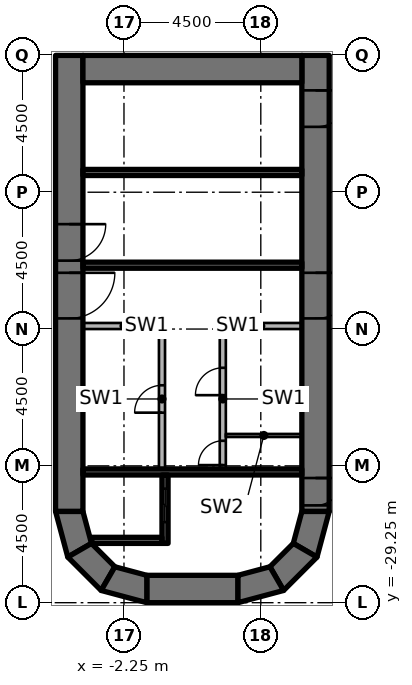
"""IFC4 building model, lengths in metres.
Left out: names, types, materials, properties, quantities, classifications, styles, units other than length and angle.
Written with IfcOpenShell. Run it as: python <this file> out.ifc"""

import sys

from ifc_helpers import new_model, si_unit, direction, frame, frame_2d, origin, place, context, subcontext, project, spatial, polyline, rectangle, outline, extrude, element, fill, save


model = new_model("IFC4")
c1 = context("Model", 3, precision=1e-05, world=origin(), true_north=direction((0.0, 1.0)))
c2 = subcontext(c1, "Body", "Model", "MODEL_VIEW")
j1 = project(units=[si_unit("LENGTHUNIT", "METRE"), si_unit("PLANEANGLEUNIT", "RADIAN")], contexts=[c1])
p1 = place(None, origin())
s1 = spatial("IfcSite", under=j1, at=p1, CompositionType="ELEMENT")
p2 = place(p1, origin())
s2 = spatial("IfcBuilding", under=s1, at=p2, CompositionType="ELEMENT")
p3 = place(p2, frame((0.0, 0.0, -8.0)))
s3 = spatial("IfcBuildingStorey", under=s2, at=p3, CompositionType="ELEMENT", Elevation=-8.0)
p4 = place(p3, frame((-4.05, -11.25, 0.0), z_axis=(0.0, 0.0, 1.0), x_axis=(0.0, -1.0, 0.0)))
e1 = element("IfcWall", 1, at=p4, inside=s3, PredefinedType="SHEAR", context=c2, shape_type="SweptSolid", body=[
    extrude(rectangle(XDim=15.0, YDim=0.9, at=frame_2d((7.5, 0.0))), origin(), (0.0, 0.0, 1.0), 4.0),
])
p5 = place(p4, frame((7.15, 0.0, 0.0)))
e2 = element("IfcOpeningElement", 2, at=p5, cuts=e1, PredefinedType="OPENING", context=c2, shape_type="SweptSolid", body=[
    extrude(rectangle(XDim=1.5, YDim=2.3, at=frame_2d((0.75, 1.15))), frame((0.0, 0.46, 0.0), z_axis=(0.0, -1.0, 0.0), x_axis=(1.0, 0.0, 0.0)), (0.0, 0.0, 1.0), 0.92),
])
p6 = place(p4, frame((5.55, 0.0, 0.0)))
e3 = element("IfcOpeningElement", 3, at=p6, cuts=e1, PredefinedType="OPENING", context=c2, shape_type="SweptSolid", body=[
    extrude(rectangle(XDim=1.2, YDim=2.1, at=frame_2d((0.6, 1.05))), frame((0.0, 0.46, 0.0), z_axis=(0.0, -1.0, 0.0), x_axis=(1.0, 0.0, 0.0)), (0.0, 0.0, 1.0), 0.92),
])
p7 = place(p3, frame((4.05, -11.25, 0.0), z_axis=(0.0, 0.0, 1.0), x_axis=(0.0, -1.0, 0.0)))
e4 = element("IfcWall", 4, at=p7, inside=s3, PredefinedType="SHEAR", context=c2, shape_type="SweptSolid", body=[
    extrude(rectangle(XDim=15.0, YDim=0.9, at=frame_2d((7.5, 0.0))), origin(), (0.0, 0.0, 1.0), 4.0),
])
p8 = place(p7, frame((7.15, 0.0, 0.0)))
e5 = element("IfcOpeningElement", 5, at=p8, cuts=e4, PredefinedType="OPENING", context=c2, shape_type="SweptSolid", body=[
    extrude(rectangle(XDim=1.5, YDim=2.3, at=frame_2d((0.75, 1.15))), frame((0.0, 0.46, 0.0), z_axis=(0.0, -1.0, 0.0), x_axis=(1.0, 0.0, 0.0)), (0.0, 0.0, 1.0), 0.92),
])
p9 = place(p7, frame((13.9, 0.0, 0.0)))
e6 = element("IfcOpeningElement", 6, at=p9, cuts=e4, PredefinedType="OPENING", context=c2, shape_type="SweptSolid", body=[
    extrude(rectangle(XDim=0.9, YDim=2.1, at=frame_2d((0.45, 1.05))), frame((0.0, 0.46, 0.0), z_axis=(0.0, -1.0, 0.0), x_axis=(1.0, 0.0, 0.0)), (0.0, 0.0, 1.0), 0.92),
])
p10 = place(p7, frame((1.15, 0.0, 0.0)))
e7 = element("IfcOpeningElement", 7, at=p10, cuts=e4, PredefinedType="OPENING", context=c2, shape_type="SweptSolid", body=[
    extrude(rectangle(XDim=1.2, YDim=2.1, at=frame_2d((0.6, 1.05))), frame((0.0, 0.46, 0.0), z_axis=(0.0, -1.0, 0.0), x_axis=(1.0, 0.0, 0.0)), (0.0, 0.0, 1.0), 0.92),
])
p11 = place(p3, frame((-3.6, -11.7, 0.0), z_axis=(0.0, 0.0, 1.0), x_axis=(1.0, 0.0, 0.0)))
e8 = element("IfcWall", 8, at=p11, inside=s3, PredefinedType="SHEAR", context=c2, shape_type="SweptSolid", body=[
    extrude(rectangle(XDim=7.2, YDim=0.9, at=frame_2d((3.6, 0.0))), origin(), (0.0, 0.0, 1.0), 4.0),
])
p12 = place(p3, frame((-1.5, -28.8, 0.0), z_axis=(0.0, 0.0, 1.0), x_axis=(1.0, 0.0, 0.0)))
e9 = element("IfcWall", 9, at=p12, inside=s3, PredefinedType="SHEAR", context=c2, shape_type="SweptSolid", body=[
    extrude(rectangle(XDim=3.0, YDim=0.9, at=frame_2d((1.5, 0.0))), origin(), (0.0, 0.0, 1.0), 4.0),
])
p13 = place(p3, origin())
e10 = element("IfcWall", 10, at=p13, inside=s3, PredefinedType="SHEAR", context=c2, shape_type="SweptSolid", body=[
    extrude(outline(polyline([(-4.5, -26.25), (-4.098, -27.75), (-3.319, -27.3), (-3.6, -26.25), (-4.5, -26.25)])), origin(), (0.0, 0.0, 1.0), 4.0),
])
p14 = place(p3, origin())
e11 = element("IfcWall", 11, at=p14, inside=s3, PredefinedType="SHEAR", context=c2, shape_type="SweptSolid", body=[
    extrude(outline(polyline([(-4.098, -27.75), (-3.0, -28.848), (-2.55, -28.069), (-3.319, -27.3), (-4.098, -27.75)])), origin(), (0.0, 0.0, 1.0), 4.0),
])
p15 = place(p3, origin())
e12 = element("IfcWall", 12, at=p15, inside=s3, PredefinedType="SHEAR", context=c2, shape_type="SweptSolid", body=[
    extrude(outline(polyline([(-3.0, -28.848), (-1.5, -29.25), (-1.5, -28.35), (-2.55, -28.069), (-3.0, -28.848)])), origin(), (0.0, 0.0, 1.0), 4.0),
])
p16 = place(p3, origin())
e13 = element("IfcWall", 13, at=p16, inside=s3, PredefinedType="SHEAR", context=c2, shape_type="SweptSolid", body=[
    extrude(outline(polyline([(4.5, -26.25), (4.098, -27.75), (3.319, -27.3), (3.6, -26.25), (4.5, -26.25)])), origin(), (0.0, 0.0, 1.0), 4.0),
])
p17 = place(p3, origin())
e14 = element("IfcWall", 14, at=p17, inside=s3, PredefinedType="SHEAR", context=c2, shape_type="SweptSolid", body=[
    extrude(outline(polyline([(4.098, -27.75), (3.0, -28.848), (2.55, -28.069), (3.319, -27.3), (4.098, -27.75)])), origin(), (0.0, 0.0, 1.0), 4.0),
])
p18 = place(p3, origin())
e15 = element("IfcWall", 15, at=p18, inside=s3, PredefinedType="SHEAR", context=c2, shape_type="SweptSolid", body=[
    extrude(outline(polyline([(3.0, -28.848), (1.5, -29.25), (1.5, -28.35), (2.55, -28.069), (3.0, -28.848)])), origin(), (0.0, 0.0, 1.0), 4.0),
])
p19 = place(p3, frame((3.6, -24.95, 0.0), z_axis=(0.0, 0.0, 1.0), x_axis=(-1.0, 0.0, 0.0)))
e16 = element("IfcWall", 16, at=p19, inside=s3, PredefinedType="SHEAR", context=c2, shape_type="SweptSolid", body=[
    extrude(rectangle(XDim=7.2, YDim=0.2, at=frame_2d((3.6, 0.0))), origin(), (0.0, 0.0, 1.0), 3.4),
])
p20 = place(p3, frame((-0.9, -27.3, 0.0), z_axis=(0.0, 0.0, 1.0), x_axis=(0.0, 1.0, 0.0)))
e17 = element("IfcWall", 17, at=p20, inside=s3, PredefinedType="SHEAR", context=c2, shape_type="SweptSolid", body=[
    extrude(rectangle(XDim=2.25, YDim=0.2, at=frame_2d((1.125, 0.0))), origin(), (0.0, 0.0, 1.0), 3.4),
])
p21 = place(p20, frame((0.7, 0.0, 0.0)))
e18 = element("IfcOpeningElement", 18, at=p21, cuts=e17, PredefinedType="OPENING", context=c2, shape_type="SweptSolid", body=[
    extrude(rectangle(XDim=1.1, YDim=2.3, at=frame_2d((0.55, 1.15))), frame((0.0, 0.11, 0.0), z_axis=(0.0, -1.0, 0.0), x_axis=(1.0, 0.0, 0.0)), (0.0, 0.0, 1.0), 0.22),
])
p22 = place(p3, origin())
e19 = element("IfcWall", 19, at=p22, inside=s3, PredefinedType="SHEAR", context=c2, shape_type="SweptSolid", body=[
    extrude(outline(polyline([(-1.0, -27.1), (-3.341, -27.1), (-3.291, -27.284), (-3.275, -27.3), (-1.0, -27.3), (-1.0, -27.1)])), origin(), (0.0, 0.0, 1.0), 3.4),
])
for number, where, z_axis, x_axis in (
    (20, (3.6, -18.15, 0.0), (0.0, 0.0, 1.0), (-1.0, 0.0, 0.0)),
    (21, (3.6, -15.1, 0.0), (0.0, 0.0, 1.0), (-1.0, 0.0, 0.0)),
):
    element("IfcWall", number, at=place(p3, frame(where, z_axis=z_axis, x_axis=x_axis)), inside=s3, PredefinedType="SHEAR", context=c2, shape_type="SweptSolid", body=[
        extrude(rectangle(XDim=7.2, YDim=0.2, at=frame_2d((3.6, 0.0))), origin(), (0.0, 0.0, 1.0), 3.4),
    ])
p23 = place(p3, frame((3.6, -20.15, 0.0), z_axis=(0.0, 0.0, 1.0), x_axis=(-1.0, 0.0, 0.0)))
e22 = element("IfcWall", 22, at=p23, inside=s3, PredefinedType="PARTITIONING", context=c2, shape_type="SweptSolid", body=[
    extrude(rectangle(XDim=2.7, YDim=0.2, at=frame_2d((1.35, 0.0))), origin(), (0.0, 0.0, 1.0), 3.4),
])
p24 = place(p3, frame((1.0, -24.85, 0.0), z_axis=(0.0, 0.0, 1.0), x_axis=(0.0, 1.0, 0.0)))
e23 = element("IfcWall", 23, at=p24, inside=s3, PredefinedType="PARTITIONING", context=c2, shape_type="SweptSolid", body=[
    extrude(rectangle(XDim=4.6, YDim=0.2, at=frame_2d((2.3, 0.0))), origin(), (0.0, 0.0, 1.0), 3.4),
])
p25 = place(p24, frame((0.125, 0.0, 0.0)))
e24 = element("IfcOpeningElement", 24, at=p25, cuts=e23, PredefinedType="OPENING", context=c2, shape_type="SweptSolid", body=[
    extrude(rectangle(XDim=0.8, YDim=2.1, at=frame_2d((0.4, 1.05))), frame((0.0, 0.11, 0.0), z_axis=(0.0, -1.0, 0.0), x_axis=(1.0, 0.0, 0.0)), (0.0, 0.0, 1.0), 0.22),
])
p26 = place(p24, frame((2.425, 0.0, 0.0)))
e25 = element("IfcOpeningElement", 25, at=p26, cuts=e23, PredefinedType="OPENING", context=c2, shape_type="SweptSolid", body=[
    extrude(rectangle(XDim=0.9, YDim=2.1, at=frame_2d((0.45, 1.05))), frame((0.0, 0.11, 0.0), z_axis=(0.0, -1.0, 0.0), x_axis=(1.0, 0.0, 0.0)), (0.0, 0.0, 1.0), 0.22),
])
p27 = place(p3, frame((-0.9, -20.15, 0.0), z_axis=(0.0, 0.0, 1.0), x_axis=(-1.0, 0.0, 0.0)))
e26 = element("IfcWall", 26, at=p27, inside=s3, PredefinedType="PARTITIONING", context=c2, shape_type="SweptSolid", body=[
    extrude(rectangle(XDim=2.7, YDim=0.2, at=frame_2d((1.35, 0.0))), origin(), (0.0, 0.0, 1.0), 3.4),
])
p28 = place(p3, frame((-1.0, -24.85, 0.0), z_axis=(0.0, 0.0, 1.0), x_axis=(0.0, 1.0, 0.0)))
e27 = element("IfcWall", 27, at=p28, inside=s3, PredefinedType="PARTITIONING", context=c2, shape_type="SweptSolid", body=[
    extrude(rectangle(XDim=4.6, YDim=0.2, at=frame_2d((2.3, 0.0))), origin(), (0.0, 0.0, 1.0), 3.4),
])
p29 = place(p28, frame((1.85, 0.0, 0.0)))
e28 = element("IfcOpeningElement", 28, at=p29, cuts=e27, PredefinedType="OPENING", context=c2, shape_type="SweptSolid", body=[
    extrude(rectangle(XDim=0.9, YDim=2.1, at=frame_2d((0.45, 1.05))), frame((0.0, 0.11, 0.0), z_axis=(0.0, -1.0, 0.0), x_axis=(1.0, 0.0, 0.0)), (0.0, 0.0, 1.0), 0.22),
])
p30 = place(p3, frame((3.6, -23.75, 0.0), z_axis=(0.0, 0.0, 1.0), x_axis=(-1.0, 0.0, 0.0)))
e29 = element("IfcWall", 29, at=p30, inside=s3, PredefinedType="PARTITIONING", context=c2, shape_type="SweptSolid", body=[
    extrude(rectangle(XDim=2.5, YDim=0.1, at=frame_2d((1.25, 0.0))), origin(), (0.0, 0.0, 1.0), 3.4),
])
p31 = place(p8, origin())
e30 = element("IfcDoor", 30, at=p31, inside=s3, OperationType="DOUBLE_DOOR_SINGLE_SWING", PredefinedType="DOOR", context=c2, shape_type="SweptSolid", body=[
    extrude(rectangle(XDim=1.5, YDim=2.3, at=frame_2d((0.75, 1.15))), frame((0.0, 0.025, 0.0), z_axis=(0.0, -1.0, 0.0), x_axis=(1.0, 0.0, 0.0)), (0.0, 0.0, 1.0), 0.05),
])
fill(e5, e30)
p32 = place(p5, origin())
e31 = element("IfcDoor", 31, at=p32, inside=s3, OperationType="DOUBLE_DOOR_SINGLE_SWING", PredefinedType="DOOR", context=c2, shape_type="SweptSolid", body=[
    extrude(rectangle(XDim=1.5, YDim=2.3, at=frame_2d((0.75, 1.15))), frame((0.0, 0.025, 0.0), z_axis=(0.0, -1.0, 0.0), x_axis=(1.0, 0.0, 0.0)), (0.0, 0.0, 1.0), 0.05),
])
fill(e2, e31)
p33 = place(p9, origin())
e32 = element("IfcDoor", 32, at=p33, inside=s3, OperationType="SINGLE_SWING_RIGHT", PredefinedType="DOOR", context=c2, shape_type="SweptSolid", body=[
    extrude(rectangle(XDim=0.9, YDim=2.1, at=frame_2d((0.45, 1.05))), frame((0.0, 0.025, 0.0), z_axis=(0.0, -1.0, 0.0), x_axis=(1.0, 0.0, 0.0)), (0.0, 0.0, 1.0), 0.05),
])
fill(e6, e32)
p34 = place(p6, origin())
e33 = element("IfcDoor", 33, at=p34, inside=s3, OperationType="SINGLE_SWING_RIGHT", PredefinedType="DOOR", context=c2, shape_type="SweptSolid", body=[
    extrude(rectangle(XDim=1.2, YDim=2.1, at=frame_2d((0.6, 1.05))), frame((0.0, 0.025, 0.0), z_axis=(0.0, -1.0, 0.0), x_axis=(1.0, 0.0, 0.0)), (0.0, 0.0, 1.0), 0.05),
])
fill(e3, e33)
p35 = place(p10, origin())
e34 = element("IfcDoor", 34, at=p35, inside=s3, OperationType="SINGLE_SWING_LEFT", PredefinedType="DOOR", context=c2, shape_type="SweptSolid", body=[
    extrude(rectangle(XDim=1.2, YDim=2.1, at=frame_2d((0.6, 1.05))), frame((0.0, 0.025, 0.0), z_axis=(0.0, -1.0, 0.0), x_axis=(1.0, 0.0, 0.0)), (0.0, 0.0, 1.0), 0.05),
])
fill(e7, e34)
p36 = place(p21, origin())
e35 = element("IfcDoor", 35, at=p36, inside=s3, OperationType="DOUBLE_DOOR_SLIDING", PredefinedType="DOOR", context=c2, shape_type="SweptSolid", body=[
    extrude(rectangle(XDim=1.1, YDim=2.3, at=frame_2d((0.55, 1.15))), frame((0.0, 0.025, 0.0), z_axis=(0.0, -1.0, 0.0), x_axis=(1.0, 0.0, 0.0)), (0.0, 0.0, 1.0), 0.05),
])
fill(e18, e35)
p37 = place(p25, origin())
e36 = element("IfcDoor", 36, at=p37, inside=s3, OperationType="SINGLE_SWING_LEFT", PredefinedType="DOOR", context=c2, shape_type="SweptSolid", body=[
    extrude(rectangle(XDim=0.8, YDim=2.1, at=frame_2d((0.4, 1.05))), frame((0.0, 0.025, 0.0), z_axis=(0.0, -1.0, 0.0), x_axis=(1.0, 0.0, 0.0)), (0.0, 0.0, 1.0), 0.05),
])
fill(e24, e36)
p38 = place(p26, origin())
e37 = element("IfcDoor", 37, at=p38, inside=s3, OperationType="SINGLE_SWING_LEFT", PredefinedType="DOOR", context=c2, shape_type="SweptSolid", body=[
    extrude(rectangle(XDim=0.9, YDim=2.1, at=frame_2d((0.45, 1.05))), frame((0.0, 0.025, 0.0), z_axis=(0.0, -1.0, 0.0), x_axis=(1.0, 0.0, 0.0)), (0.0, 0.0, 1.0), 0.05),
])
fill(e25, e37)
p39 = place(p29, origin())
e38 = element("IfcDoor", 38, at=p39, inside=s3, OperationType="SINGLE_SWING_LEFT", PredefinedType="DOOR", context=c2, shape_type="SweptSolid", body=[
    extrude(rectangle(XDim=0.9, YDim=2.1, at=frame_2d((0.45, 1.05))), frame((0.0, 0.025, 0.0), z_axis=(0.0, -1.0, 0.0), x_axis=(1.0, 0.0, 0.0)), (0.0, 0.0, 1.0), 0.05),
])
fill(e28, e38)
save(model, sys.argv[1])
